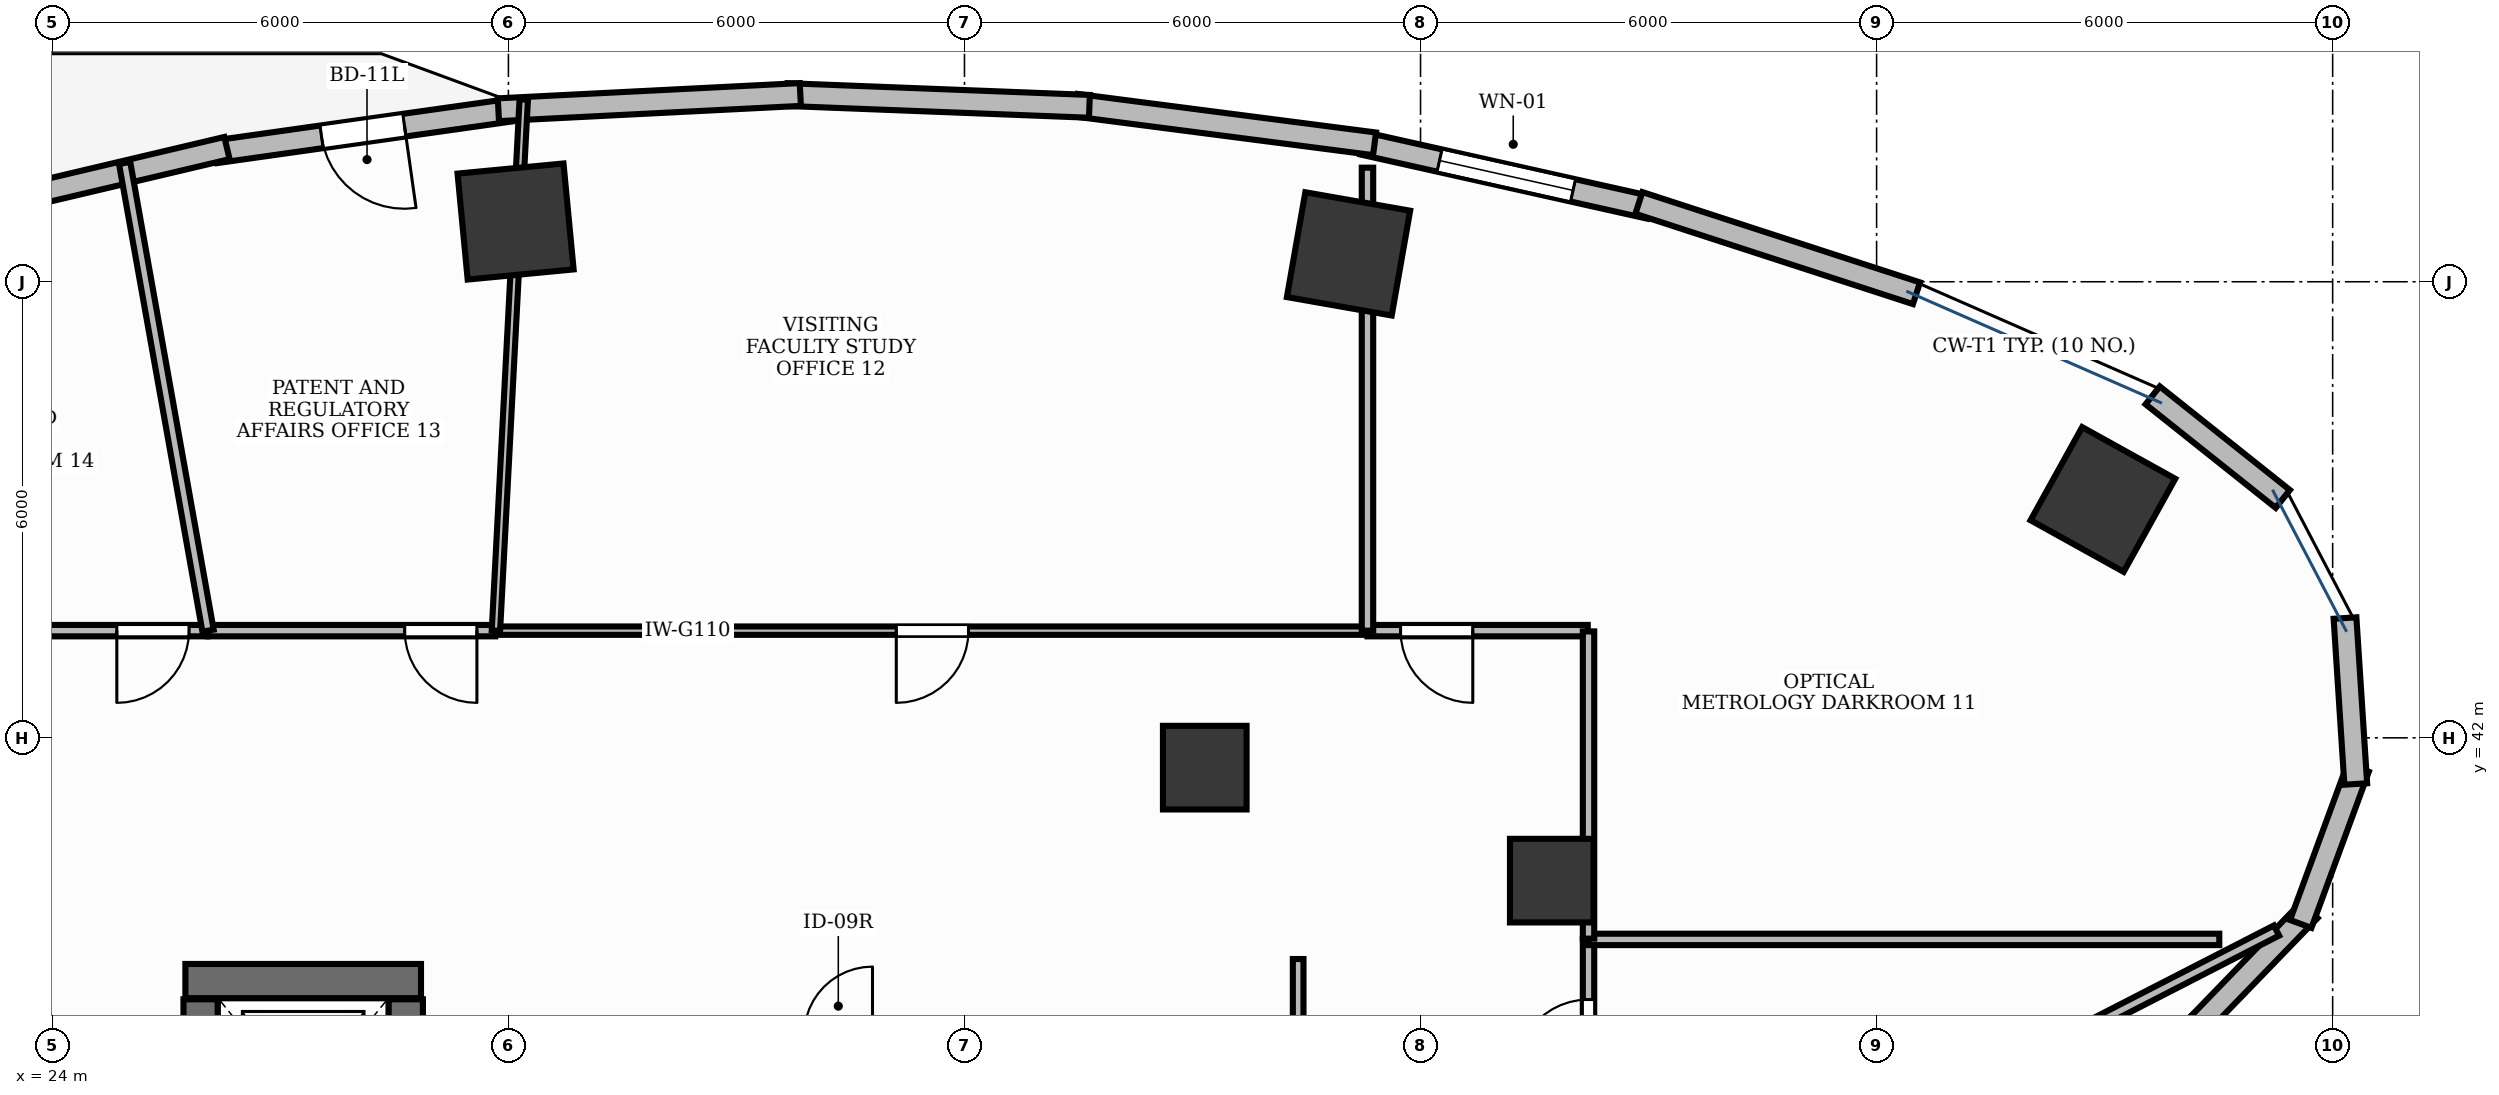
"""IFC4 building model, lengths in metres.
Left out: names, types, materials, properties, quantities, classifications, styles, units other than length and angle.
Written with IfcOpenShell. Run it as: python <this file> out.ifc"""

import sys

from ifc_helpers import new_model, si_unit, direction, frame, frame_2d, origin, origin_2d, place, context, subcontext, project, spatial, rectangle, extrude, element, fill, save


model = new_model("IFC4")
c1 = context("Model", 3, precision=1e-05, world=origin(), true_north=direction((0.0, 1.0)))
c2 = subcontext(c1, "Body", "Model", "MODEL_VIEW")
j1 = project(units=[si_unit("LENGTHUNIT", "METRE"), si_unit("PLANEANGLEUNIT", "RADIAN")], contexts=[c1])
p1 = place(None, origin())
s1 = spatial("IfcSite", under=j1, at=p1, CompositionType="ELEMENT")
p2 = place(p1, origin())
s2 = spatial("IfcBuilding", under=s1, at=p2, CompositionType="ELEMENT")
p3 = place(p2, frame((0.0, 0.0, 34.2)))
s3 = spatial("IfcBuildingStorey", under=s2, at=p3, CompositionType="ELEMENT", Elevation=34.2)
p4 = place(p3, frame((25.75, 38.8, 0.0), z_axis=(0.0, 0.0, 1.0), x_axis=(1.0, 0.0, 0.0)))
e1 = element("IfcWall", 1, at=p4, inside=s3, PredefinedType="SHEAR", context=c2, shape_type="SweptSolid", body=[
    extrude(rectangle(XDim=3.1, YDim=0.45, at=frame_2d((1.55, 0.0))), origin(), (0.0, 0.0, 1.0), 3.9),
])
for number, where, z_axis, x_axis in (
    (2, (25.95, 35.86, 0.0), (0.0, 0.0, 1.0), (0.0, 1.0, 0.0)),
    (3, (28.65, 35.86, 0.0), (0.0, 0.0, 1.0), (0.0, 1.0, 0.0)),
):
    element("IfcWall", number, at=place(p3, frame(where, z_axis=z_axis, x_axis=x_axis)), inside=s3, PredefinedType="SHEAR", context=c2, shape_type="SweptSolid", body=[
        extrude(rectangle(XDim=2.7, YDim=0.45, at=frame_2d((1.35, 0.0))), origin(), (0.0, 0.0, 1.0), 3.9),
    ])
p5 = place(p3, frame((50.977, 45.135, -0.0), z_axis=(0.0, 0.0, 1.0), x_axis=(-0.874535078577, 0.484962262797, 0.0)))
e4 = element("IfcColumn", 4, at=p5, inside=s3, PredefinedType="COLUMN", context=c2, shape_type="SweptSolid", body=[
    extrude(rectangle(XDim=1.4, YDim=1.4, at=origin_2d()), origin(), (0.0, 0.0, 1.0), 3.901),
])
p6 = place(p3, frame((43.727, 40.121, -0.0), z_axis=(0.0, 0.0, 1.0), x_axis=(1.0, 0.0, 0.0)))
e5 = element("IfcColumn", 5, at=p6, inside=s3, PredefinedType="COLUMN", context=c2, shape_type="SweptSolid", body=[
    extrude(rectangle(XDim=1.1, YDim=1.1, at=origin_2d()), origin(), (0.0, 0.0, 1.0), 3.901),
])
p7 = place(p3, frame((41.052, 48.367, -0.0), z_axis=(0.0, 0.0, 1.0), x_axis=(-0.984868307662, 0.173304404339, 0.0)))
e6 = element("IfcColumn", 6, at=p7, inside=s3, PredefinedType="COLUMN", context=c2, shape_type="SweptSolid", body=[
    extrude(rectangle(XDim=1.4, YDim=1.4, at=origin_2d()), origin(), (0.0, 0.0, 1.0), 3.901),
])
p8 = place(p3, frame((39.161, 41.608, -0.0), z_axis=(0.0, 0.0, 1.0), x_axis=(1.0, 0.0, 0.0)))
e7 = element("IfcColumn", 7, at=p8, inside=s3, PredefinedType="COLUMN", context=c2, shape_type="SweptSolid", body=[
    extrude(rectangle(XDim=1.1, YDim=1.1, at=origin_2d()), origin(), (0.0, 0.0, 1.0), 3.901),
])
p9 = place(p3, frame((30.094, 48.792, -0.0), z_axis=(0.0, 0.0, 1.0), x_axis=(0.995462868748, 0.095150811579, 0.0)))
e8 = element("IfcColumn", 8, at=p9, inside=s3, PredefinedType="COLUMN", context=c2, shape_type="SweptSolid", body=[
    extrude(rectangle(XDim=1.4, YDim=1.4, at=origin_2d()), origin(), (0.0, 0.0, 1.0), 3.901),
])
p10 = place(p3, frame((45.016, 48.976, 0.0), z_axis=(0.0, 0.0, 1.0), x_axis=(-0.9758772609, 0.218319883791, 0.0)))
e9 = element("IfcWall", 9, at=p10, inside=s3, PredefinedType="STANDARD", context=c2, shape_type="SweptSolid", body=[
    extrude(rectangle(XDim=3.869, YDim=0.3, at=frame_2d((1.935, 0.0))), origin(), (0.0, 0.0, 1.0), 3.9),
])
p11 = place(p10, frame((1.034, 0.0, 0.9)))
e10 = element("IfcOpeningElement", 10, at=p11, cuts=e9, PredefinedType="OPENING", context=c2, shape_type="SweptSolid", body=[
    extrude(rectangle(XDim=1.8, YDim=2.1, at=frame_2d((0.9, 1.05))), frame((0.0, 0.165, 0.0), z_axis=(0.0, -1.0, 0.0), x_axis=(1.0, 0.0, 0.0)), (0.0, 0.0, 1.0), 0.33),
])
p12 = place(p3, frame((30.023, 50.257, 0.0), z_axis=(0.0, 0.0, 1.0), x_axis=(-0.990165573956, -0.139900450869, 0.0)))
e11 = element("IfcWall", 11, at=p12, inside=s3, PredefinedType="STANDARD", context=c2, shape_type="SweptSolid", body=[
    extrude(rectangle(XDim=3.911, YDim=0.3, at=frame_2d((1.956, 0.0))), origin(), (0.0, 0.0, 1.0), 3.9),
])
p13 = place(p12, frame((1.406, 0.0, 0.0)))
e12 = element("IfcOpeningElement", 12, at=p13, cuts=e11, PredefinedType="OPENING", context=c2, shape_type="SweptSolid", body=[
    extrude(rectangle(XDim=1.1, YDim=2.15, at=frame_2d((0.55, 1.075))), frame((0.0, 0.165, 0.0), z_axis=(0.0, -1.0, 0.0), x_axis=(1.0, 0.0, 0.0)), (0.0, 0.0, 1.0), 0.33),
])
p14 = place(p3, frame((48.525, 47.849, 0.0), z_axis=(0.0, 0.0, 1.0), x_axis=(-0.950965833732, 0.309295947393, 0.0)))
e13 = element("IfcWall", 13, at=p14, inside=s3, PredefinedType="STANDARD", context=c2, shape_type="SweptSolid", body=[
    extrude(rectangle(XDim=3.84, YDim=0.3, at=frame_2d((1.92, 0.0))), origin(), (0.0, 0.0, 1.0), 3.9),
])
p15 = place(p3, frame((41.395, 49.815, 0.0), z_axis=(0.0, 0.0, 1.0), x_axis=(-0.991734095036, 0.128310111617, 0.0)))
e14 = element("IfcWall", 14, at=p15, inside=s3, PredefinedType="STANDARD", context=c2, shape_type="SweptSolid", body=[
    extrude(rectangle(XDim=3.956, YDim=0.3, at=frame_2d((1.978, 0.0))), origin(), (0.0, 0.0, 1.0), 3.9),
])
p16 = place(p3, frame((37.644, 50.308, 0.0), z_axis=(0.0, 0.0, 1.0), x_axis=(-0.999245411623, 0.038840794937, 0.0)))
e15 = element("IfcWall", 15, at=p16, inside=s3, PredefinedType="STANDARD", context=c2, shape_type="SweptSolid", body=[
    extrude(rectangle(XDim=3.979, YDim=0.3, at=frame_2d((1.989, 0.0))), origin(), (0.0, 0.0, 1.0), 3.9),
])
p17 = place(p3, frame((33.84, 50.463, 0.0), z_axis=(0.0, 0.0, 1.0), x_axis=(-0.998732359232, -0.050335619826, 0.0)))
e16 = element("IfcWall", 16, at=p17, inside=s3, PredefinedType="STANDARD", context=c2, shape_type="SweptSolid", body=[
    extrude(rectangle(XDim=3.977, YDim=0.3, at=frame_2d((1.989, 0.0))), origin(), (0.0, 0.0, 1.0), 3.9),
])
p18 = place(p3, frame((26.297, 49.759, 0.0), z_axis=(0.0, 0.0, 1.0), x_axis=(-0.973197600754, -0.229970497863, 0.0)))
e17 = element("IfcWall", 17, at=p18, inside=s3, PredefinedType="STANDARD", context=c2, shape_type="SweptSolid", body=[
    extrude(rectangle(XDim=3.901, YDim=0.3, at=frame_2d((1.951, 0.0))), origin(), (0.0, 0.0, 1.0), 3.9),
])
p19 = place(p3, frame((49.709, 36.029, 0.0), z_axis=(0.0, 0.0, 1.0), x_axis=(0.754746490246, 0.656016566454, 0.0)))
e18 = element("IfcWall", 18, at=p19, inside=s3, PredefinedType="STANDARD", context=c2, shape_type="SweptSolid", body=[
    extrude(rectangle(XDim=3.43, YDim=0.3, at=frame_2d((1.715, 0.0))), origin(), (0.0, 0.0, 1.0), 3.9),
])
p20 = place(p3, frame((52.173, 38.161, 0.0), z_axis=(0.0, 0.0, 1.0), x_axis=(0.695404695719, 0.718618333451, 0.0)))
e19 = element("IfcWall", 19, at=p20, inside=s3, PredefinedType="STANDARD", context=c2, shape_type="SweptSolid", body=[
    extrude(rectangle(XDim=2.188, YDim=0.3, at=frame_2d((1.094, 0.0))), origin(), (0.0, 0.0, 1.0), 3.9),
])
for number, where, z_axis, x_axis in (
    (20, (53.58, 39.552, 0.0), (0.0, 0.0, 1.0), (0.345, 0.939, 0.0)),
    (21, (54.304, 41.393, 0.0), (0.0, 0.0, 1.0), (-0.065, 0.998, 0.0)),
    (22, (53.344, 45.143, 0.0), (0.0, 0.0, 1.0), (-0.782, 0.623, 0.0)),
):
    element("IfcWall", number, at=place(p3, frame(where, z_axis=z_axis, x_axis=x_axis)), inside=s3, PredefinedType="STANDARD", context=c2, shape_type="SweptSolid", body=[
        extrude(rectangle(XDim=2.188, YDim=0.3, at=frame_2d((1.094, 0.0))), origin(), (0.0, 0.0, 1.0), 3.9),
    ])
p21 = place(p3, frame((44.21, 34.83, 0.0), z_axis=(0.0, 0.0, 1.0), x_axis=(0.0, 1.0, 0.0)))
e23 = element("IfcWall", 23, at=p21, inside=s3, PredefinedType="PARTITIONING", context=c2, shape_type="SweptSolid", body=[
    extrude(rectangle(XDim=4.518, YDim=0.15, at=frame_2d((2.259, 0.0))), origin(), (0.0, 0.0, 1.0), 2.91),
])
p22 = place(p21, frame((2.777, 0.0, 0.0)))
e24 = element("IfcOpeningElement", 24, at=p22, cuts=e23, PredefinedType="OPENING", context=c2, shape_type="SweptSolid", body=[
    extrude(rectangle(XDim=0.95, YDim=2.15, at=frame_2d((0.475, 1.075))), frame((0.0, 0.09, 0.0), z_axis=(0.0, -1.0, 0.0), x_axis=(1.0, 0.0, 0.0)), (0.0, 0.0, 1.0), 0.18),
])
p23 = place(p3, frame((40.39, 39.09, 0.0), z_axis=(0.0, 0.0, 1.0), x_axis=(0.0, -1.0, 0.0)))
e25 = element("IfcWall", 25, at=p23, inside=s3, PredefinedType="PARTITIONING", context=c2, shape_type="SweptSolid", body=[
    extrude(rectangle(XDim=10.48, YDim=0.14, at=frame_2d((5.24, 0.0))), origin(), (0.0, 0.0, 1.0), 2.91),
])
p24 = place(p23, frame((6.447, 0.0, 0.0)))
e26 = element("IfcOpeningElement", 26, at=p24, cuts=e25, PredefinedType="OPENING", context=c2, shape_type="SweptSolid", body=[
    extrude(rectangle(XDim=0.95, YDim=2.15, at=frame_2d((0.475, 1.075))), frame((0.0, 0.085, 0.0), z_axis=(0.0, -1.0, 0.0), x_axis=(1.0, 0.0, 0.0)), (0.0, 0.0, 1.0), 0.17),
])
p25 = place(p3, frame((44.2, 43.41, 0.0), z_axis=(0.0, 0.0, 1.0), x_axis=(-1.0, 0.0, 0.0)))
e27 = element("IfcWall", 27, at=p25, inside=s3, PredefinedType="PARTITIONING", context=c2, shape_type="SweptSolid", body=[
    extrude(rectangle(XDim=2.898, YDim=0.15, at=frame_2d((1.449, 0.0))), origin(), (0.0, 0.0, 1.0), 2.91),
])
p26 = place(p25, frame((1.513, 0.0, 0.0)))
e28 = element("IfcOpeningElement", 28, at=p26, cuts=e27, PredefinedType="OPENING", context=c2, shape_type="SweptSolid", body=[
    extrude(rectangle(XDim=0.95, YDim=2.15, at=frame_2d((0.475, 1.075))), frame((0.0, 0.09, 0.0), z_axis=(0.0, -1.0, 0.0), x_axis=(1.0, 0.0, 0.0)), (0.0, 0.0, 1.0), 0.18),
])
p27 = place(p3, frame((41.292, 43.41, 0.0), z_axis=(0.0, 0.0, 1.0), x_axis=(-1.0, 0.0, 0.0)))
e29 = element("IfcWall", 29, at=p27, inside=s3, PredefinedType="MOVABLE", context=c2, shape_type="SweptSolid", body=[
    extrude(rectangle(XDim=11.456, YDim=0.11, at=frame_2d((5.728, 0.0))), origin(), (0.0, 0.0, 1.0), 2.91),
])
p28 = place(p27, frame((5.239, 0.0, 0.0)))
e30 = element("IfcOpeningElement", 30, at=p28, cuts=e29, PredefinedType="OPENING", context=c2, shape_type="SweptSolid", body=[
    extrude(rectangle(XDim=0.95, YDim=2.15, at=frame_2d((0.475, 1.075))), frame((0.0, 0.07, 0.0), z_axis=(0.0, -1.0, 0.0), x_axis=(1.0, 0.0, 0.0)), (0.0, 0.0, 1.0), 0.14),
])
p29 = place(p3, frame((29.826, 43.41, 0.0), z_axis=(0.0, 0.0, 1.0), x_axis=(-1.0, 0.0, 0.0)))
e31 = element("IfcWall", 31, at=p29, inside=s3, PredefinedType="PARTITIONING", context=c2, shape_type="SweptSolid", body=[
    extrude(rectangle(XDim=3.777, YDim=0.15, at=frame_2d((1.889, 0.0))), origin(), (0.0, 0.0, 1.0), 2.91),
])
p30 = place(p29, frame((0.24, 0.0, 0.0)))
e32 = element("IfcOpeningElement", 32, at=p30, cuts=e31, PredefinedType="OPENING", context=c2, shape_type="SweptSolid", body=[
    extrude(rectangle(XDim=0.95, YDim=2.15, at=frame_2d((0.475, 1.075))), frame((0.0, 0.09, 0.0), z_axis=(0.0, -1.0, 0.0), x_axis=(1.0, 0.0, 0.0)), (0.0, 0.0, 1.0), 0.18),
])
p31 = place(p3, frame((26.038, 43.41, 0.0), z_axis=(0.0, 0.0, 1.0), x_axis=(-1.0, 0.0, 0.0)))
e33 = element("IfcWall", 33, at=p31, inside=s3, PredefinedType="PARTITIONING", context=c2, shape_type="SweptSolid", body=[
    extrude(rectangle(XDim=10.447, YDim=0.15, at=frame_2d((5.224, 0.0))), origin(), (0.0, 0.0, 1.0), 2.91),
])
p32 = place(p31, frame((0.24, 0.0, 0.0)))
e34 = element("IfcOpeningElement", 34, at=p32, cuts=e33, PredefinedType="OPENING", context=c2, shape_type="SweptSolid", body=[
    extrude(rectangle(XDim=0.95, YDim=2.15, at=frame_2d((0.475, 1.075))), frame((0.0, 0.09, 0.0), z_axis=(0.0, -1.0, 0.0), x_axis=(1.0, 0.0, 0.0)), (0.0, 0.0, 1.0), 0.18),
])
p33 = place(p3, frame((44.21, 34.819, 0.0), z_axis=(0.0, 0.0, 1.0), x_axis=(0.889650018361, 0.456643016842, 0.0)))
e35 = element("IfcWall", 35, at=p33, inside=s3, PredefinedType="PARTITIONING", context=c2, shape_type="SweptSolid", body=[
    extrude(rectangle(XDim=10.174, YDim=0.15, at=frame_2d((5.087, 0.0))), origin(), (0.0, 0.0, 1.0), 2.91),
])
p34 = place(p3, frame((44.21, 39.348, 0.0), z_axis=(0.0, 0.0, 1.0), x_axis=(1.0, 0.0, 0.0)))
e36 = element("IfcWall", 36, at=p34, inside=s3, PredefinedType="PARTITIONING", context=c2, shape_type="SweptSolid", body=[
    extrude(rectangle(XDim=8.299, YDim=0.15, at=frame_2d((4.149, 0.0))), origin(), (0.0, 0.0, 1.0), 2.91),
])
p35 = place(p3, frame((44.21, 39.358, 0.0), z_axis=(0.0, 0.0, 1.0), x_axis=(0.0, 1.0, 0.0)))
e37 = element("IfcWall", 37, at=p35, inside=s3, PredefinedType="PARTITIONING", context=c2, shape_type="SweptSolid", body=[
    extrude(rectangle(XDim=4.042, YDim=0.15, at=frame_2d((2.021, 0.0))), origin(), (0.0, 0.0, 1.0), 2.91),
])
p36 = place(p3, frame((41.302, 43.41, 0.0), z_axis=(0.0, 0.0, 1.0), x_axis=(0.0, 1.0, 0.0)))
e38 = element("IfcWall", 38, at=p36, inside=s3, PredefinedType="PARTITIONING", context=c2, shape_type="SweptSolid", body=[
    extrude(rectangle(XDim=6.091, YDim=0.15, at=frame_2d((3.045, 0.0))), origin(), (0.0, 0.0, 1.0), 2.91),
])
p37 = place(p3, frame((29.836, 43.41, 0.0), z_axis=(0.0, 0.0, 1.0), x_axis=(0.052328125399, 0.998629945121, 0.0)))
e39 = element("IfcWall", 39, at=p37, inside=s3, PredefinedType="MOVABLE", context=c2, shape_type="SweptSolid", body=[
    extrude(rectangle(XDim=6.998, YDim=0.11, at=frame_2d((3.499, 0.0))), origin(), (0.0, 0.0, 1.0), 2.91),
])
p38 = place(p3, frame((26.048, 43.41, 0.0), z_axis=(0.0, 0.0, 1.0), x_axis=(-0.175605435055, 0.984460629573, 0.0)))
e40 = element("IfcWall", 40, at=p38, inside=s3, PredefinedType="PARTITIONING", context=c2, shape_type="SweptSolid", body=[
    extrude(rectangle(XDim=6.251, YDim=0.15, at=frame_2d((3.125, 0.0))), origin(), (0.0, 0.0, 1.0), 2.91),
])
p39 = place(p11, origin())
e41 = element("IfcWindow", 41, at=p39, inside=s3, PartitioningType="SINGLE_PANEL", PredefinedType="WINDOW", context=c2, shape_type="SweptSolid", body=[
    extrude(rectangle(XDim=1.8, YDim=2.1, at=frame_2d((0.9, 1.05))), frame((0.0, 0.03, 0.0), z_axis=(0.0, -1.0, 0.0), x_axis=(1.0, 0.0, 0.0)), (0.0, 0.0, 1.0), 0.06),
])
fill(e10, e41)
p40 = place(p13, origin())
e42 = element("IfcDoor", 42, at=p40, inside=s3, OperationType="SINGLE_SWING_LEFT", PredefinedType="DOOR", context=c2, shape_type="SweptSolid", body=[
    extrude(rectangle(XDim=1.1, YDim=2.15, at=frame_2d((0.55, 1.075))), frame((0.0, 0.025, 0.0), z_axis=(0.0, -1.0, 0.0), x_axis=(1.0, 0.0, 0.0)), (0.0, 0.0, 1.0), 0.05),
])
fill(e12, e42)
p41 = place(p22, origin())
e43 = element("IfcDoor", 43, at=p41, inside=s3, OperationType="SINGLE_SWING_LEFT", PredefinedType="DOOR", context=c2, shape_type="SweptSolid", body=[
    extrude(rectangle(XDim=0.95, YDim=2.15, at=frame_2d((0.475, 1.075))), frame((0.0, 0.025, 0.0), z_axis=(0.0, -1.0, 0.0), x_axis=(1.0, 0.0, 0.0)), (0.0, 0.0, 1.0), 0.05),
])
fill(e24, e43)
p42 = place(p26, origin())
e44 = element("IfcDoor", 44, at=p42, inside=s3, OperationType="SINGLE_SWING_LEFT", PredefinedType="DOOR", context=c2, shape_type="SweptSolid", body=[
    extrude(rectangle(XDim=0.95, YDim=2.15, at=frame_2d((0.475, 1.075))), frame((0.0, 0.025, 0.0), z_axis=(0.0, -1.0, 0.0), x_axis=(1.0, 0.0, 0.0)), (0.0, 0.0, 1.0), 0.05),
])
fill(e28, e44)
p43 = place(p28, origin())
e45 = element("IfcDoor", 45, at=p43, inside=s3, OperationType="SINGLE_SWING_RIGHT", PredefinedType="DOOR", context=c2, shape_type="SweptSolid", body=[
    extrude(rectangle(XDim=0.95, YDim=2.15, at=frame_2d((0.475, 1.075))), frame((0.0, 0.025, 0.0), z_axis=(0.0, -1.0, 0.0), x_axis=(1.0, 0.0, 0.0)), (0.0, 0.0, 1.0), 0.05),
])
fill(e30, e45)
p44 = place(p30, origin())
e46 = element("IfcDoor", 46, at=p44, inside=s3, OperationType="SINGLE_SWING_LEFT", PredefinedType="DOOR", context=c2, shape_type="SweptSolid", body=[
    extrude(rectangle(XDim=0.95, YDim=2.15, at=frame_2d((0.475, 1.075))), frame((0.0, 0.025, 0.0), z_axis=(0.0, -1.0, 0.0), x_axis=(1.0, 0.0, 0.0)), (0.0, 0.0, 1.0), 0.05),
])
fill(e32, e46)
p45 = place(p32, origin())
e47 = element("IfcDoor", 47, at=p45, inside=s3, OperationType="SINGLE_SWING_RIGHT", PredefinedType="DOOR", context=c2, shape_type="SweptSolid", body=[
    extrude(rectangle(XDim=0.95, YDim=2.15, at=frame_2d((0.475, 1.075))), frame((0.0, 0.025, 0.0), z_axis=(0.0, -1.0, 0.0), x_axis=(1.0, 0.0, 0.0)), (0.0, 0.0, 1.0), 0.05),
])
fill(e34, e47)
save(model, sys.argv[1])
